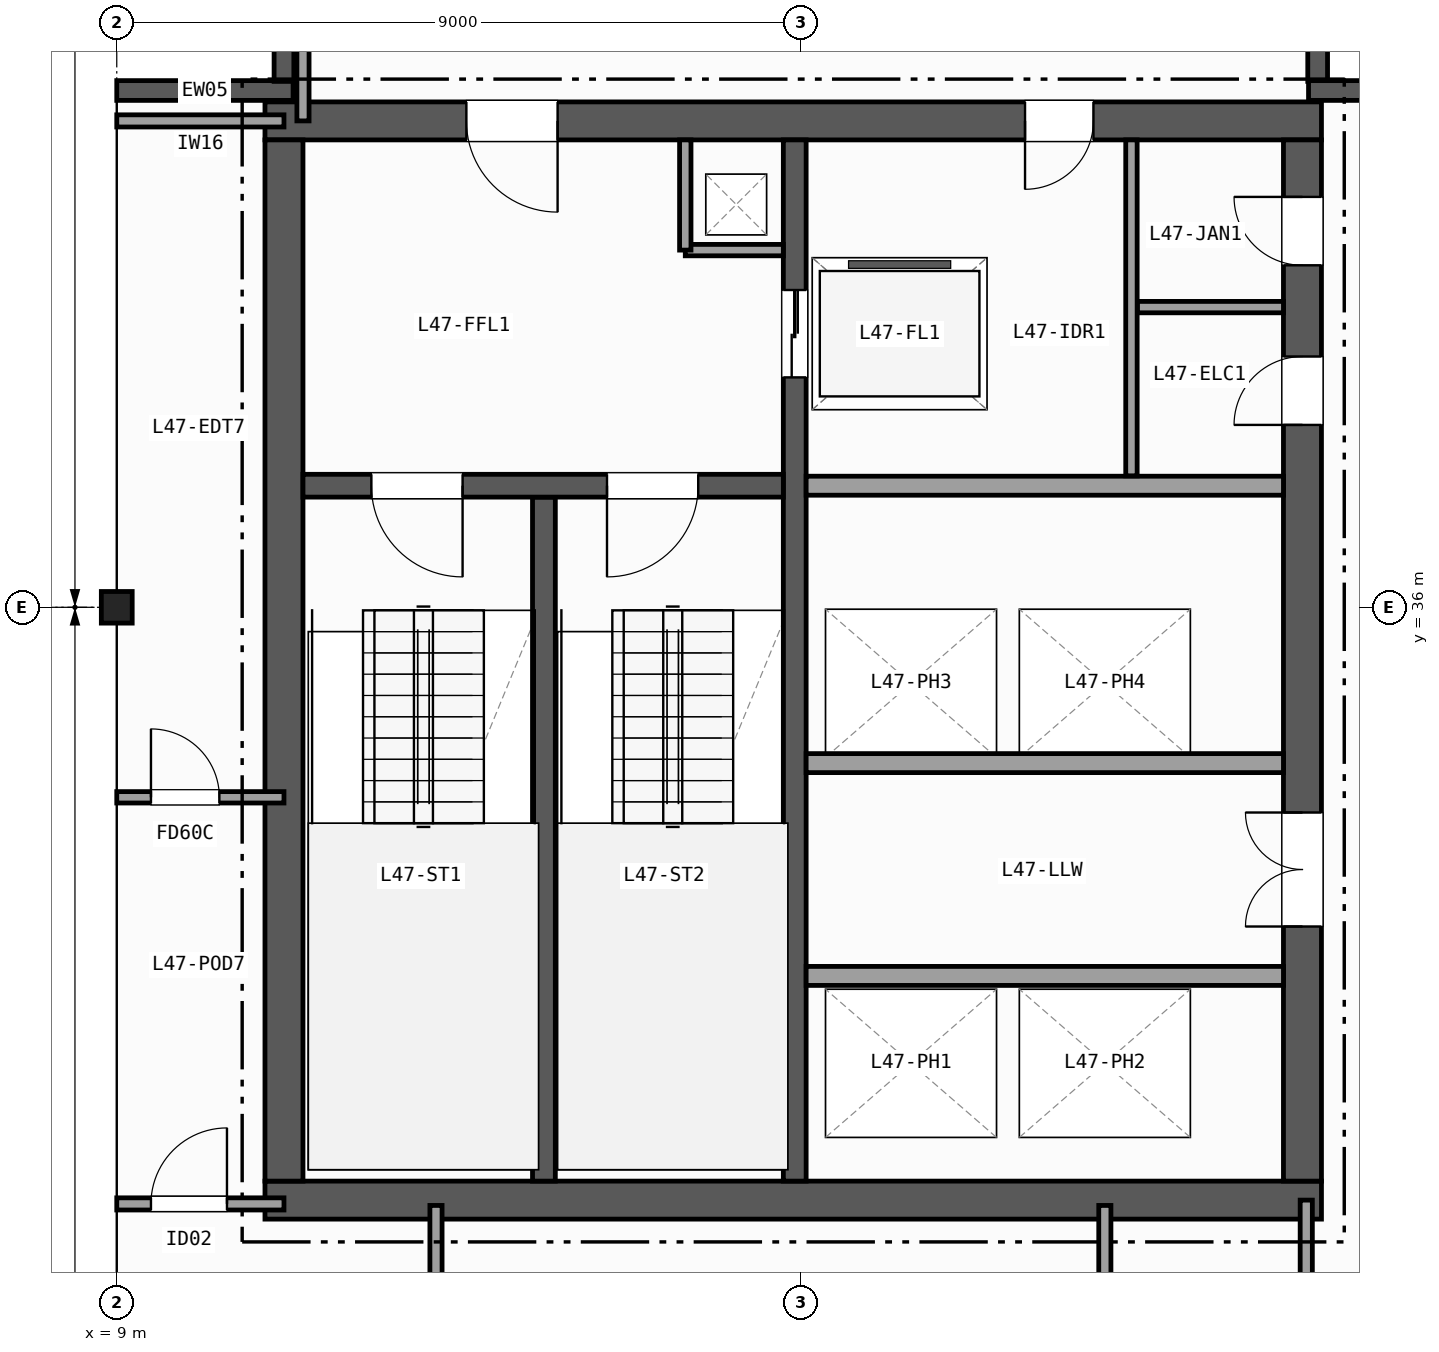
"""IFC4 building model, lengths in metres.
Left out: names, types, materials, properties, quantities, classifications, styles, units other than length and angle.
Written with IfcOpenShell. Run it as: python <this file> out.ifc"""

import sys

from ifc_helpers import new_model, si_unit, direction, frame, frame_2d, origin, origin_2d, place, context, subcontext, project, spatial, rectangle, i_section, extrude, element, fill, save


model = new_model("IFC4")
c1 = context("Model", 3, precision=1e-05, world=origin(), true_north=direction((0.0, 1.0)))
c2 = subcontext(c1, "Body", "Model", "MODEL_VIEW")
j1 = project(units=[si_unit("LENGTHUNIT", "METRE"), si_unit("PLANEANGLEUNIT", "RADIAN")], contexts=[c1])
p1 = place(None, origin())
s1 = spatial("IfcSite", under=j1, at=p1, CompositionType="ELEMENT")
p2 = place(p1, origin())
s2 = spatial("IfcBuilding", under=s1, at=p2, CompositionType="ELEMENT")
p3 = place(p2, frame((0.0, 0.0, 189.0)))
s3 = spatial("IfcBuildingStorey", under=s2, at=p3, CompositionType="ELEMENT", Elevation=189.0)
p4 = place(p3, frame((9.0, 36.0, 0.0), z_axis=(0.0, 0.0, 1.0), x_axis=(1.0, 0.0, 0.0)))
e1 = element("IfcColumn", 1, at=p4, inside=s3, PredefinedType="COLUMN", context=c2, shape_type="SweptSolid", body=[
    extrude(i_section(OverallWidth=0.406, OverallDepth=0.416, WebThickness=0.03, FlangeThickness=0.048, FilletRadius=0.015, at=origin_2d()), origin(), (0.0, 0.0, 1.0), 3.7),
])
p5 = place(p3, frame((9.0, 42.8, 0.0), z_axis=(0.0, 0.0, 1.0), x_axis=(1.0, 0.0, 0.0)))
e2 = element("IfcWall", 2, at=p5, inside=s3, PredefinedType="SOLIDWALL", context=c2, shape_type="SweptSolid", body=[
    extrude(rectangle(XDim=2.32, YDim=0.26, at=frame_2d((1.16, 0.0))), origin(), (0.0, 0.0, 1.0), 3.42),
])
for number, where, z_axis, x_axis in (
    (3, (11.2, 42.92, 0.0), (0.0, 0.0, 1.0), (0.0, 1.0, 0.0)),
    (4, (24.8, 45.0, 0.0), (0.0, 0.0, 1.0), (0.0, -1.0, 0.0)),
):
    element("IfcWall", number, at=place(p3, frame(where, z_axis=z_axis, x_axis=x_axis)), inside=s3, PredefinedType="SOLIDWALL", context=c2, shape_type="SweptSolid", body=[
        extrude(rectangle(XDim=2.08, YDim=0.26, at=frame_2d((1.04, 0.0))), origin(), (0.0, 0.0, 1.0), 3.42),
    ])
p6 = place(p3, frame((24.68, 42.8, 0.0), z_axis=(0.0, 0.0, 1.0), x_axis=(1.0, 0.0, 0.0)))
e5 = element("IfcWall", 5, at=p6, inside=s3, PredefinedType="SOLIDWALL", context=c2, shape_type="SweptSolid", body=[
    extrude(rectangle(XDim=2.32, YDim=0.26, at=frame_2d((1.16, 0.0))), origin(), (0.0, 0.0, 1.0), 3.42),
])
p7 = place(p3, frame((10.95, 28.2, 0.0), z_axis=(0.0, 0.0, 1.0), x_axis=(1.0, 0.0, 0.0)))
e6 = element("IfcWall", 6, at=p7, inside=s3, PredefinedType="SHEAR", context=c2, shape_type="SweptSolid", body=[
    extrude(rectangle(XDim=13.9, YDim=0.5, at=frame_2d((6.95, 0.0))), origin(), (0.0, 0.0, 1.0), 3.42),
])
p8 = place(p3, frame((24.85, 42.4, 0.0), z_axis=(0.0, 0.0, 1.0), x_axis=(-1.0, 0.0, 0.0)))
e7 = element("IfcWall", 7, at=p8, inside=s3, PredefinedType="SHEAR", context=c2, shape_type="SweptSolid", body=[
    extrude(rectangle(XDim=13.9, YDim=0.5, at=frame_2d((6.95, 0.0))), origin(), (0.0, 0.0, 1.0), 3.42),
])
p9 = place(p8, frame((10.05, 0.0, 0.0)))
e8 = element("IfcOpeningElement", 8, at=p9, cuts=e7, PredefinedType="OPENING", context=c2, shape_type="SweptSolid", body=[
    extrude(rectangle(XDim=1.2, YDim=2.15, at=frame_2d((0.6, 1.075))), frame((0.0, 0.26, 0.0), z_axis=(0.0, -1.0, 0.0), x_axis=(1.0, 0.0, 0.0)), (0.0, 0.0, 1.0), 0.52),
])
p10 = place(p8, frame((3.0, 0.0, 0.0)))
e9 = element("IfcOpeningElement", 9, at=p10, cuts=e7, PredefinedType="OPENING", context=c2, shape_type="SweptSolid", body=[
    extrude(rectangle(XDim=0.9, YDim=2.1, at=frame_2d((0.45, 1.05))), frame((0.0, 0.26, 0.0), z_axis=(0.0, -1.0, 0.0), x_axis=(1.0, 0.0, 0.0)), (0.0, 0.0, 1.0), 0.52),
])
p11 = place(p3, frame((11.2, 42.15, 0.0), z_axis=(0.0, 0.0, 1.0), x_axis=(0.0, -1.0, 0.0)))
e10 = element("IfcWall", 10, at=p11, inside=s3, PredefinedType="SHEAR", context=c2, shape_type="SweptSolid", body=[
    extrude(rectangle(XDim=13.7, YDim=0.5, at=frame_2d((6.85, 0.0))), origin(), (0.0, 0.0, 1.0), 3.42),
])
p12 = place(p3, frame((24.6, 28.45, 0.0), z_axis=(0.0, 0.0, 1.0), x_axis=(0.0, 1.0, 0.0)))
e11 = element("IfcWall", 11, at=p12, inside=s3, PredefinedType="SHEAR", context=c2, shape_type="SweptSolid", body=[
    extrude(rectangle(XDim=13.7, YDim=0.5, at=frame_2d((6.85, 0.0))), origin(), (0.0, 0.0, 1.0), 3.42),
])
p13 = place(p12, frame((3.35, 0.0, 0.0)))
e12 = element("IfcOpeningElement", 12, at=p13, cuts=e11, PredefinedType="OPENING", context=c2, shape_type="SweptSolid", body=[
    extrude(rectangle(XDim=1.5, YDim=2.2, at=frame_2d((0.75, 1.1))), frame((0.0, 0.26, 0.0), z_axis=(0.0, -1.0, 0.0), x_axis=(1.0, 0.0, 0.0)), (0.0, 0.0, 1.0), 0.52),
])
p14 = place(p12, frame((9.95, 0.0, 0.0)))
e13 = element("IfcOpeningElement", 13, at=p14, cuts=e11, PredefinedType="OPENING", context=c2, shape_type="SweptSolid", body=[
    extrude(rectangle(XDim=0.9, YDim=2.1, at=frame_2d((0.45, 1.05))), frame((0.0, 0.26, 0.0), z_axis=(0.0, -1.0, 0.0), x_axis=(1.0, 0.0, 0.0)), (0.0, 0.0, 1.0), 0.52),
])
p15 = place(p12, frame((12.05, 0.0, 0.0)))
e14 = element("IfcOpeningElement", 14, at=p15, cuts=e11, PredefinedType="OPENING", context=c2, shape_type="SweptSolid", body=[
    extrude(rectangle(XDim=0.9, YDim=2.1, at=frame_2d((0.45, 1.05))), frame((0.0, 0.26, 0.0), z_axis=(0.0, -1.0, 0.0), x_axis=(1.0, 0.0, 0.0)), (0.0, 0.0, 1.0), 0.52),
])
p16 = place(p3, frame((14.62, 28.45, 0.0), z_axis=(0.0, 0.0, 1.0), x_axis=(0.0, 1.0, 0.0)))
e15 = element("IfcWall", 15, at=p16, inside=s3, PredefinedType="SHEAR", context=c2, shape_type="SweptSolid", body=[
    extrude(rectangle(XDim=9.0, YDim=0.3, at=frame_2d((4.5, 0.0))), origin(), (0.0, 0.0, 1.0), 3.42),
])
p17 = place(p3, frame((17.92, 42.15, 0.0), z_axis=(0.0, 0.0, 1.0), x_axis=(0.0, -1.0, 0.0)))
e16 = element("IfcWall", 16, at=p17, inside=s3, PredefinedType="SHEAR", context=c2, shape_type="SweptSolid", body=[
    extrude(rectangle(XDim=13.7, YDim=0.3, at=frame_2d((6.85, 0.0))), origin(), (0.0, 0.0, 1.0), 3.42),
])
p18 = place(p17, frame((1.975, 0.0, 0.0)))
e17 = element("IfcOpeningElement", 17, at=p18, cuts=e16, PredefinedType="OPENING", context=c2, shape_type="SweptSolid", body=[
    extrude(rectangle(XDim=1.15, YDim=2.15, at=frame_2d((0.575, 1.075))), frame((0.0, 0.16, 0.0), z_axis=(0.0, -1.0, 0.0), x_axis=(1.0, 0.0, 0.0)), (0.0, 0.0, 1.0), 0.32),
])
p19 = place(p3, frame((17.77, 37.6, 0.0), z_axis=(0.0, 0.0, 1.0), x_axis=(-1.0, 0.0, 0.0)))
e18 = element("IfcWall", 18, at=p19, inside=s3, PredefinedType="SHEAR", context=c2, shape_type="SweptSolid", body=[
    extrude(rectangle(XDim=6.32, YDim=0.3, at=frame_2d((3.16, 0.0))), origin(), (0.0, 0.0, 1.0), 3.42),
])
p20 = place(p19, frame((4.22, 0.0, 0.0)))
e19 = element("IfcOpeningElement", 19, at=p20, cuts=e18, PredefinedType="OPENING", context=c2, shape_type="SweptSolid", body=[
    extrude(rectangle(XDim=1.2, YDim=2.15, at=frame_2d((0.6, 1.075))), frame((0.0, 0.16, 0.0), z_axis=(0.0, -1.0, 0.0), x_axis=(1.0, 0.0, 0.0)), (0.0, 0.0, 1.0), 0.32),
])
p21 = place(p19, frame((1.12, 0.0, 0.0)))
e20 = element("IfcOpeningElement", 20, at=p21, cuts=e18, PredefinedType="OPENING", context=c2, shape_type="SweptSolid", body=[
    extrude(rectangle(XDim=1.2, YDim=2.15, at=frame_2d((0.6, 1.075))), frame((0.0, 0.16, 0.0), z_axis=(0.0, -1.0, 0.0), x_axis=(1.0, 0.0, 0.0)), (0.0, 0.0, 1.0), 0.32),
])
p22 = place(p3, frame((16.48, 40.7, 0.0), z_axis=(0.0, 0.0, 1.0), x_axis=(1.0, 0.0, 0.0)))
e21 = element("IfcWall", 21, at=p22, inside=s3, PredefinedType="PARTITIONING", context=c2, shape_type="SweptSolid", body=[
    extrude(rectangle(XDim=1.29, YDim=0.15, at=frame_2d((0.645, 0.0))), origin(), (0.0, 0.0, 1.0), 3.42),
])
p23 = place(p3, frame((16.48, 40.7, 0.0), z_axis=(0.0, 0.0, 1.0), x_axis=(0.0, 1.0, 0.0)))
e22 = element("IfcWall", 22, at=p23, inside=s3, PredefinedType="PARTITIONING", context=c2, shape_type="SweptSolid", body=[
    extrude(rectangle(XDim=1.45, YDim=0.15, at=frame_2d((0.725, 0.0))), origin(), (0.0, 0.0, 1.0), 3.42),
])
for number, where, z_axis, x_axis in (
    (23, (18.07, 37.6, 0.0), (0.0, 0.0, 1.0), (1.0, 0.0, 0.0)),
    (24, (18.07, 31.15, 0.0), (0.0, 0.0, 1.0), (1.0, 0.0, 0.0)),
    (25, (24.35, 33.95, 0.0), (0.0, 0.0, 1.0), (-1.0, 0.0, 0.0)),
):
    element("IfcWall", number, at=place(p3, frame(where, z_axis=z_axis, x_axis=x_axis)), inside=s3, PredefinedType="PARTITIONING", context=c2, shape_type="SweptSolid", body=[
        extrude(rectangle(XDim=6.28, YDim=0.25, at=frame_2d((3.14, 0.0))), origin(), (0.0, 0.0, 1.0), 3.42),
    ])
p24 = place(p3, frame((22.35, 37.73, 0.0), z_axis=(0.0, 0.0, 1.0), x_axis=(0.0, 1.0, 0.0)))
e26 = element("IfcWall", 26, at=p24, inside=s3, PredefinedType="PARTITIONING", context=c2, shape_type="SweptSolid", body=[
    extrude(rectangle(XDim=4.42, YDim=0.15, at=frame_2d((2.21, 0.0))), origin(), (0.0, 0.0, 1.0), 3.42),
])
p25 = place(p3, frame((22.43, 39.95, 0.0), z_axis=(0.0, 0.0, 1.0), x_axis=(1.0, 0.0, 0.0)))
e27 = element("IfcWall", 27, at=p25, inside=s3, PredefinedType="PARTITIONING", context=c2, shape_type="SweptSolid", body=[
    extrude(rectangle(XDim=1.92, YDim=0.15, at=frame_2d((0.96, 0.0))), origin(), (0.0, 0.0, 1.0), 3.42),
])
p26 = place(p3, frame((9.0, 28.15, 0.0), z_axis=(0.0, 0.0, 1.0), x_axis=(1.0, 0.0, 0.0)))
e28 = element("IfcWall", 28, at=p26, inside=s3, PredefinedType="PARTITIONING", context=c2, shape_type="SweptSolid", body=[
    extrude(rectangle(XDim=2.2, YDim=0.16, at=frame_2d((1.1, 0.0))), origin(), (0.0, 0.0, 1.0), 2.634),
])
p27 = place(p26, frame((0.45, 0.0, 0.0)))
e29 = element("IfcOpeningElement", 29, at=p27, cuts=e28, PredefinedType="OPENING", context=c2, shape_type="SweptSolid", body=[
    extrude(rectangle(XDim=1.0, YDim=2.1, at=frame_2d((0.5, 1.05))), frame((0.0, 0.09, 0.0), z_axis=(0.0, -1.0, 0.0), x_axis=(1.0, 0.0, 0.0)), (0.0, 0.0, 1.0), 0.18),
])
p28 = place(p3, frame((9.0, 42.4, 0.0), z_axis=(0.0, 0.0, 1.0), x_axis=(1.0, 0.0, 0.0)))
e30 = element("IfcWall", 30, at=p28, inside=s3, PredefinedType="PARTITIONING", context=c2, shape_type="SweptSolid", body=[
    extrude(rectangle(XDim=2.2, YDim=0.16, at=frame_2d((1.1, 0.0))), origin(), (0.0, 0.0, 1.0), 3.42),
])
p29 = place(p3, frame((11.45, 42.4, 0.0), z_axis=(0.0, 0.0, 1.0), x_axis=(0.0, 1.0, 0.0)))
e31 = element("IfcWall", 31, at=p29, inside=s3, PredefinedType="PARTITIONING", context=c2, shape_type="SweptSolid", body=[
    extrude(rectangle(XDim=2.666, YDim=0.16, at=frame_2d((1.333, 0.0))), origin(), (0.0, 0.0, 1.0), 3.42),
])
p30 = place(p3, frame((9.0, 33.5, 0.0), z_axis=(0.0, 0.0, 1.0), x_axis=(1.0, 0.0, 0.0)))
e32 = element("IfcWall", 32, at=p30, inside=s3, PredefinedType="PARTITIONING", context=c2, shape_type="SweptSolid", body=[
    extrude(rectangle(XDim=2.2, YDim=0.15, at=frame_2d((1.1, 0.0))), origin(), (0.0, 0.0, 1.0), 2.634),
])
p31 = place(p30, frame((0.45, 0.0, 0.0)))
e33 = element("IfcOpeningElement", 33, at=p31, cuts=e32, PredefinedType="OPENING", context=c2, shape_type="SweptSolid", body=[
    extrude(rectangle(XDim=0.9, YDim=2.1, at=frame_2d((0.45, 1.05))), frame((0.0, 0.085, 0.0), z_axis=(0.0, -1.0, 0.0), x_axis=(1.0, 0.0, 0.0)), (0.0, 0.0, 1.0), 0.17),
])
p32 = place(p3, frame((24.65, 9.0, 0.0), z_axis=(0.0, 0.0, 1.0), x_axis=(0.0, 1.0, 0.0)))
e34 = element("IfcWall", 34, at=p32, inside=s3, PredefinedType="PARTITIONING", context=c2, shape_type="SweptSolid", body=[
    extrude(rectangle(XDim=19.2, YDim=0.16, at=frame_2d((9.6, 0.0))), origin(), (0.0, 0.0, 1.0), 2.634),
])
p33 = place(p32, frame((12.2, 0.0, 0.0)))
e35 = element("IfcOpeningElement", 35, at=p33, cuts=e34, PredefinedType="OPENING", context=c2, shape_type="SweptSolid", body=[
    extrude(rectangle(XDim=1.2, YDim=2.15, at=frame_2d((0.6, 1.075))), frame((0.0, 0.09, 0.0), z_axis=(0.0, -1.0, 0.0), x_axis=(1.0, 0.0, 0.0)), (0.0, 0.0, 1.0), 0.18),
])
p34 = place(p32, frame((4.2, 0.0, 0.0)))
e36 = element("IfcOpeningElement", 36, at=p34, cuts=e34, PredefinedType="OPENING", context=c2, shape_type="SweptSolid", body=[
    extrude(rectangle(XDim=0.86, YDim=2.05, at=frame_2d((0.43, 1.025))), frame((0.0, 0.09, 0.0), z_axis=(0.0, -1.0, 0.0), x_axis=(1.0, 0.0, 0.0)), (0.0, 0.0, 1.0), 0.18),
])
p35 = place(p3, frame((13.2, 18.0, 0.0), z_axis=(0.0, 0.0, 1.0), x_axis=(0.0, 1.0, 0.0)))
e37 = element("IfcWall", 37, at=p35, inside=s3, PredefinedType="PARTITIONING", context=c2, shape_type="SweptSolid", body=[
    extrude(rectangle(XDim=10.13, YDim=0.16, at=frame_2d((5.065, 0.0))), origin(), (0.0, 0.0, 1.0), 2.789),
])
p36 = place(p35, frame((2.5, 0.0, 0.0)))
e38 = element("IfcOpeningElement", 38, at=p36, cuts=e37, PredefinedType="OPENING", context=c2, shape_type="SweptSolid", body=[
    extrude(rectangle(XDim=0.95, YDim=2.1, at=frame_2d((0.475, 1.05))), frame((0.0, 0.09, 0.0), z_axis=(0.0, -1.0, 0.0), x_axis=(1.0, 0.0, 0.0)), (0.0, 0.0, 1.0), 0.18),
])
p37 = place(p3, frame((22.0, 18.0, 0.0), z_axis=(0.0, 0.0, 1.0), x_axis=(0.0, 1.0, 0.0)))
e39 = element("IfcWall", 39, at=p37, inside=s3, PredefinedType="PARTITIONING", context=c2, shape_type="SweptSolid", body=[
    extrude(rectangle(XDim=10.13, YDim=0.16, at=frame_2d((5.065, 0.0))), origin(), (0.0, 0.0, 1.0), 2.789),
])
p38 = place(p37, frame((2.5, 0.0, 0.0)))
e40 = element("IfcOpeningElement", 40, at=p38, cuts=e39, PredefinedType="OPENING", context=c2, shape_type="SweptSolid", body=[
    extrude(rectangle(XDim=1.0, YDim=2.1, at=frame_2d((0.5, 1.05))), frame((0.0, 0.09, 0.0), z_axis=(0.0, -1.0, 0.0), x_axis=(1.0, 0.0, 0.0)), (0.0, 0.0, 1.0), 0.18),
])
p39 = place(p20, origin())
e41 = element("IfcDoor", 41, at=p39, inside=s3, OperationType="SINGLE_SWING_LEFT", PredefinedType="DOOR", context=c2, shape_type="SweptSolid", body=[
    extrude(rectangle(XDim=1.2, YDim=2.15, at=frame_2d((0.6, 1.075))), frame((0.0, 0.025, 0.0), z_axis=(0.0, -1.0, 0.0), x_axis=(1.0, 0.0, 0.0)), (0.0, 0.0, 1.0), 0.05),
])
fill(e19, e41)
p40 = place(p21, origin())
e42 = element("IfcDoor", 42, at=p40, inside=s3, OperationType="SINGLE_SWING_RIGHT", PredefinedType="DOOR", context=c2, shape_type="SweptSolid", body=[
    extrude(rectangle(XDim=1.2, YDim=2.15, at=frame_2d((0.6, 1.075))), frame((0.0, 0.025, 0.0), z_axis=(0.0, -1.0, 0.0), x_axis=(1.0, 0.0, 0.0)), (0.0, 0.0, 1.0), 0.05),
])
fill(e20, e42)
p41 = place(p13, origin())
e43 = element("IfcDoor", 43, at=p41, inside=s3, OperationType="DOUBLE_DOOR_SINGLE_SWING", PredefinedType="DOOR", context=c2, shape_type="SweptSolid", body=[
    extrude(rectangle(XDim=1.5, YDim=2.2, at=frame_2d((0.75, 1.1))), frame((0.0, 0.025, 0.0), z_axis=(0.0, -1.0, 0.0), x_axis=(1.0, 0.0, 0.0)), (0.0, 0.0, 1.0), 0.05),
])
fill(e12, e43)
p42 = place(p9, origin())
e44 = element("IfcDoor", 44, at=p42, inside=s3, OperationType="SINGLE_SWING_LEFT", PredefinedType="DOOR", context=c2, shape_type="SweptSolid", body=[
    extrude(rectangle(XDim=1.2, YDim=2.15, at=frame_2d((0.6, 1.075))), frame((0.0, 0.025, 0.0), z_axis=(0.0, -1.0, 0.0), x_axis=(1.0, 0.0, 0.0)), (0.0, 0.0, 1.0), 0.05),
])
fill(e8, e44)
p43 = place(p14, origin())
e45 = element("IfcDoor", 45, at=p43, inside=s3, OperationType="SINGLE_SWING_LEFT", PredefinedType="DOOR", context=c2, shape_type="SweptSolid", body=[
    extrude(rectangle(XDim=0.9, YDim=2.1, at=frame_2d((0.45, 1.05))), frame((0.0, 0.025, 0.0), z_axis=(0.0, -1.0, 0.0), x_axis=(1.0, 0.0, 0.0)), (0.0, 0.0, 1.0), 0.05),
])
fill(e13, e45)
p44 = place(p10, origin())
e46 = element("IfcDoor", 46, at=p44, inside=s3, OperationType="SINGLE_SWING_RIGHT", PredefinedType="DOOR", context=c2, shape_type="SweptSolid", body=[
    extrude(rectangle(XDim=0.9, YDim=2.1, at=frame_2d((0.45, 1.05))), frame((0.0, 0.025, 0.0), z_axis=(0.0, -1.0, 0.0), x_axis=(1.0, 0.0, 0.0)), (0.0, 0.0, 1.0), 0.05),
])
fill(e9, e46)
p45 = place(p15, origin())
e47 = element("IfcDoor", 47, at=p45, inside=s3, OperationType="SINGLE_SWING_RIGHT", PredefinedType="DOOR", context=c2, shape_type="SweptSolid", body=[
    extrude(rectangle(XDim=0.9, YDim=2.1, at=frame_2d((0.45, 1.05))), frame((0.0, 0.025, 0.0), z_axis=(0.0, -1.0, 0.0), x_axis=(1.0, 0.0, 0.0)), (0.0, 0.0, 1.0), 0.05),
])
fill(e14, e47)
p46 = place(p18, origin())
e48 = element("IfcDoor", 48, at=p46, inside=s3, OperationType="DOUBLE_DOOR_SLIDING", PredefinedType="DOOR", context=c2, shape_type="SweptSolid", body=[
    extrude(rectangle(XDim=1.15, YDim=2.15, at=frame_2d((0.575, 1.075))), frame((0.0, 0.025, 0.0), z_axis=(0.0, -1.0, 0.0), x_axis=(1.0, 0.0, 0.0)), (0.0, 0.0, 1.0), 0.05),
])
fill(e17, e48)
p47 = place(p27, origin())
e49 = element("IfcDoor", 49, at=p47, inside=s3, OperationType="SINGLE_SWING_RIGHT", PredefinedType="DOOR", context=c2, shape_type="SweptSolid", body=[
    extrude(rectangle(XDim=1.0, YDim=2.1, at=frame_2d((0.5, 1.05))), frame((0.0, 0.025, 0.0), z_axis=(0.0, -1.0, 0.0), x_axis=(1.0, 0.0, 0.0)), (0.0, 0.0, 1.0), 0.05),
])
fill(e29, e49)
p48 = place(p31, origin())
e50 = element("IfcDoor", 50, at=p48, inside=s3, OperationType="SINGLE_SWING_LEFT", PredefinedType="DOOR", context=c2, shape_type="SweptSolid", body=[
    extrude(rectangle(XDim=0.9, YDim=2.1, at=frame_2d((0.45, 1.05))), frame((0.0, 0.025, 0.0), z_axis=(0.0, -1.0, 0.0), x_axis=(1.0, 0.0, 0.0)), (0.0, 0.0, 1.0), 0.05),
])
fill(e33, e50)
save(model, sys.argv[1])
